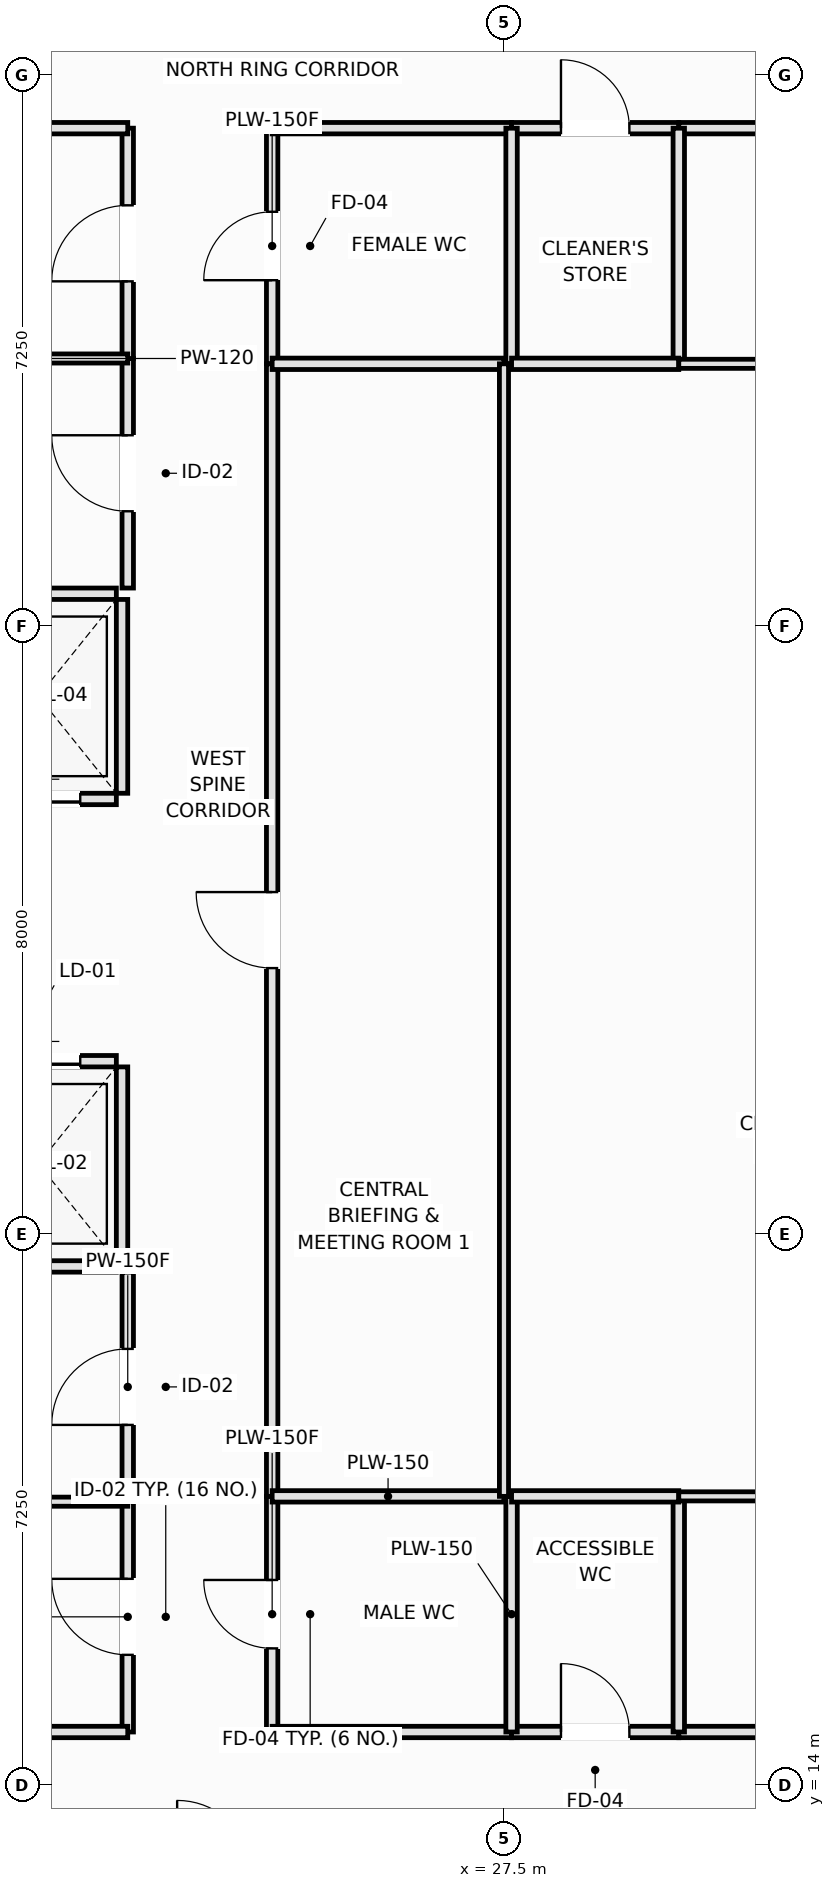
"""IFC4 building model, lengths in metres.
Left out: names, types, materials, properties, quantities, classifications, styles, units other than length and angle.
Written with IfcOpenShell. Run it as: python <this file> out.ifc"""

import sys

from ifc_helpers import new_model, si_unit, direction, frame, frame_2d, origin, place, context, subcontext, project, spatial, rectangle, extrude, element, fill, save


model = new_model("IFC4")
c1 = context("Model", 3, precision=1e-05, world=origin(), true_north=direction((0.0, 1.0)))
c2 = subcontext(c1, "Body", "Model", "MODEL_VIEW")
j1 = project(units=[si_unit("LENGTHUNIT", "METRE"), si_unit("PLANEANGLEUNIT", "RADIAN")], contexts=[c1])
p1 = place(None, origin())
s1 = spatial("IfcSite", under=j1, at=p1, CompositionType="ELEMENT")
p2 = place(p1, origin())
s2 = spatial("IfcBuilding", under=s1, at=p2, CompositionType="ELEMENT")
p3 = place(p2, frame((0.0, 0.0, 29.15)))
s3 = spatial("IfcBuildingStorey", under=s2, at=p3, CompositionType="ELEMENT", Elevation=29.15)
p4 = place(p3, frame((20.35, 20.825, 0.0), z_axis=(0.0, 0.0, 1.0), x_axis=(1.0, 0.0, 0.0)))
e1 = element("IfcWall", 1, at=p4, inside=s3, PredefinedType="PARTITIONING", context=c2, shape_type="SweptSolid", body=[
    extrude(rectangle(XDim=2.05, YDim=0.15, at=frame_2d((1.025, 0.0))), origin(), (0.0, 0.0, 1.0), 3.37),
])
p5 = place(p3, frame((20.35, 23.525, 0.0), z_axis=(0.0, 0.0, 1.0), x_axis=(1.0, 0.0, 0.0)))
e2 = element("IfcWall", 2, at=p5, inside=s3, PredefinedType="PARTITIONING", context=c2, shape_type="SweptSolid", body=[
    extrude(rectangle(XDim=2.05, YDim=0.15, at=frame_2d((1.025, 0.0))), origin(), (0.0, 0.0, 1.0), 3.37),
])
p6 = place(p5, frame((0.475, 0.0, 0.0)))
e3 = element("IfcOpeningElement", 3, at=p6, cuts=e2, PredefinedType="OPENING", context=c2, shape_type="SweptSolid", body=[
    extrude(rectangle(XDim=1.1, YDim=2.2, at=frame_2d((0.55, 1.1))), frame((0.0, 0.085, 0.0), z_axis=(0.0, -1.0, 0.0), x_axis=(1.0, 0.0, 0.0)), (0.0, 0.0, 1.0), 0.17),
])
p7 = place(p3, frame((22.475, 20.9, 0.0), z_axis=(0.0, 0.0, 1.0), x_axis=(0.0, 1.0, 0.0)))
e4 = element("IfcWall", 4, at=p7, inside=s3, PredefinedType="PARTITIONING", context=c2, shape_type="SweptSolid", body=[
    extrude(rectangle(XDim=2.55, YDim=0.15, at=frame_2d((1.275, 0.0))), origin(), (0.0, 0.0, 1.0), 3.37),
])
p8 = place(p3, frame((20.35, 26.975, 0.0), z_axis=(0.0, 0.0, 1.0), x_axis=(1.0, 0.0, 0.0)))
e5 = element("IfcWall", 5, at=p8, inside=s3, PredefinedType="PARTITIONING", context=c2, shape_type="SweptSolid", body=[
    extrude(rectangle(XDim=2.05, YDim=0.15, at=frame_2d((1.025, 0.0))), origin(), (0.0, 0.0, 1.0), 3.37),
])
p9 = place(p8, frame((0.475, 0.0, 0.0)))
e6 = element("IfcOpeningElement", 6, at=p9, cuts=e5, PredefinedType="OPENING", context=c2, shape_type="SweptSolid", body=[
    extrude(rectangle(XDim=1.1, YDim=2.2, at=frame_2d((0.55, 1.1))), frame((0.0, 0.085, 0.0), z_axis=(0.0, -1.0, 0.0), x_axis=(1.0, 0.0, 0.0)), (0.0, 0.0, 1.0), 0.17),
])
p10 = place(p3, frame((20.35, 29.675, 0.0), z_axis=(0.0, 0.0, 1.0), x_axis=(1.0, 0.0, 0.0)))
e7 = element("IfcWall", 7, at=p10, inside=s3, PredefinedType="PARTITIONING", context=c2, shape_type="SweptSolid", body=[
    extrude(rectangle(XDim=2.05, YDim=0.15, at=frame_2d((1.025, 0.0))), origin(), (0.0, 0.0, 1.0), 3.37),
])
p11 = place(p3, frame((22.475, 27.05, 0.0), z_axis=(0.0, 0.0, 1.0), x_axis=(0.0, 1.0, 0.0)))
e8 = element("IfcWall", 8, at=p11, inside=s3, PredefinedType="PARTITIONING", context=c2, shape_type="SweptSolid", body=[
    extrude(rectangle(XDim=2.55, YDim=0.15, at=frame_2d((1.275, 0.0))), origin(), (0.0, 0.0, 1.0), 3.37),
])
p12 = place(p3, frame((22.55, 14.7, 0.0), z_axis=(0.0, 0.0, 1.0), x_axis=(0.0, 1.0, 0.0)))
e9 = element("IfcWall", 9, at=p12, inside=s3, PredefinedType="PARTITIONING", context=c2, shape_type="SweptSolid", body=[
    extrude(rectangle(XDim=3.03, YDim=0.15, at=frame_2d((1.515, 0.0))), origin(), (0.0, 0.0, 1.0), 3.01),
])
p13 = place(p12, frame((1.015, 0.0, 0.0)))
e10 = element("IfcOpeningElement", 10, at=p13, cuts=e9, PredefinedType="OPENING", context=c2, shape_type="SweptSolid", body=[
    extrude(rectangle(XDim=1.0, YDim=2.15, at=frame_2d((0.5, 1.075))), frame((0.0, 0.085, 0.0), z_axis=(0.0, -1.0, 0.0), x_axis=(1.0, 0.0, 0.0)), (0.0, 0.0, 1.0), 0.17),
])
p14 = place(p3, frame((22.55, 17.73, 0.0), z_axis=(0.0, 0.0, 1.0), x_axis=(0.0, 1.0, 0.0)))
e11 = element("IfcWall", 11, at=p14, inside=s3, PredefinedType="PARTITIONING", context=c2, shape_type="SweptSolid", body=[
    extrude(rectangle(XDim=3.02, YDim=0.15, at=frame_2d((1.51, 0.0))), origin(), (0.0, 0.0, 1.0), 3.01),
])
p15 = place(p14, frame((1.01, 0.0, 0.0)))
e12 = element("IfcOpeningElement", 12, at=p15, cuts=e11, PredefinedType="OPENING", context=c2, shape_type="SweptSolid", body=[
    extrude(rectangle(XDim=1.0, YDim=2.15, at=frame_2d((0.5, 1.075))), frame((0.0, 0.085, 0.0), z_axis=(0.0, -1.0, 0.0), x_axis=(1.0, 0.0, 0.0)), (0.0, 0.0, 1.0), 0.17),
])
p16 = place(p3, frame((22.55, 29.75, 0.0), z_axis=(0.0, 0.0, 1.0), x_axis=(0.0, 1.0, 0.0)))
e13 = element("IfcWall", 13, at=p16, inside=s3, PredefinedType="PARTITIONING", context=c2, shape_type="SweptSolid", body=[
    extrude(rectangle(XDim=3.02, YDim=0.15, at=frame_2d((1.51, 0.0))), origin(), (0.0, 0.0, 1.0), 3.01),
])
p17 = place(p16, frame((1.01, 0.0, 0.0)))
e14 = element("IfcOpeningElement", 14, at=p17, cuts=e13, PredefinedType="OPENING", context=c2, shape_type="SweptSolid", body=[
    extrude(rectangle(XDim=1.0, YDim=2.15, at=frame_2d((0.5, 1.075))), frame((0.0, 0.085, 0.0), z_axis=(0.0, -1.0, 0.0), x_axis=(1.0, 0.0, 0.0)), (0.0, 0.0, 1.0), 0.17),
])
p18 = place(p3, frame((22.55, 32.77, 0.0), z_axis=(0.0, 0.0, 1.0), x_axis=(0.0, 1.0, 0.0)))
e15 = element("IfcWall", 15, at=p18, inside=s3, PredefinedType="PARTITIONING", context=c2, shape_type="SweptSolid", body=[
    extrude(rectangle(XDim=3.03, YDim=0.15, at=frame_2d((1.515, 0.0))), origin(), (0.0, 0.0, 1.0), 3.01),
])
p19 = place(p18, frame((1.015, 0.0, 0.0)))
e16 = element("IfcOpeningElement", 16, at=p19, cuts=e15, PredefinedType="OPENING", context=c2, shape_type="SweptSolid", body=[
    extrude(rectangle(XDim=1.0, YDim=2.15, at=frame_2d((0.5, 1.075))), frame((0.0, 0.085, 0.0), z_axis=(0.0, -1.0, 0.0), x_axis=(1.0, 0.0, 0.0)), (0.0, 0.0, 1.0), 0.17),
])
p20 = place(p3, frame((24.45, 14.7, 0.0), z_axis=(0.0, 0.0, 1.0), x_axis=(0.0, 1.0, 0.0)))
e17 = element("IfcWall", 17, at=p20, inside=s3, PredefinedType="PLUMBINGWALL", context=c2, shape_type="SweptSolid", body=[
    extrude(rectangle(XDim=3.1, YDim=0.15, at=frame_2d((1.55, 0.0))), origin(), (0.0, 0.0, 1.0), 3.37),
])
p21 = place(p20, frame((1.1, 0.0, 0.0)))
e18 = element("IfcOpeningElement", 18, at=p21, cuts=e17, PredefinedType="OPENING", context=c2, shape_type="SweptSolid", body=[
    extrude(rectangle(XDim=0.9, YDim=2.1, at=frame_2d((0.45, 1.05))), frame((0.0, 0.085, 0.0), z_axis=(0.0, -1.0, 0.0), x_axis=(1.0, 0.0, 0.0)), (0.0, 0.0, 1.0), 0.17),
])
p22 = place(p3, frame((24.45, 32.7, 0.0), z_axis=(0.0, 0.0, 1.0), x_axis=(0.0, 1.0, 0.0)))
e19 = element("IfcWall", 19, at=p22, inside=s3, PredefinedType="PLUMBINGWALL", context=c2, shape_type="SweptSolid", body=[
    extrude(rectangle(XDim=3.1, YDim=0.15, at=frame_2d((1.55, 0.0))), origin(), (0.0, 0.0, 1.0), 3.37),
])
p23 = place(p22, frame((1.1, 0.0, 0.0)))
e20 = element("IfcOpeningElement", 20, at=p23, cuts=e19, PredefinedType="OPENING", context=c2, shape_type="SweptSolid", body=[
    extrude(rectangle(XDim=0.9, YDim=2.1, at=frame_2d((0.45, 1.05))), frame((0.0, 0.085, 0.0), z_axis=(0.0, -1.0, 0.0), x_axis=(1.0, 0.0, 0.0)), (0.0, 0.0, 1.0), 0.17),
])
p24 = place(p3, frame((24.45, 17.8, 0.0), z_axis=(0.0, 0.0, 1.0), x_axis=(0.0, 1.0, 0.0)))
e21 = element("IfcWall", 21, at=p24, inside=s3, PredefinedType="PARTITIONING", context=c2, shape_type="SweptSolid", body=[
    extrude(rectangle(XDim=14.9, YDim=0.15, at=frame_2d((7.45, 0.0))), origin(), (0.0, 0.0, 1.0), 3.37),
])
p25 = place(p24, frame((6.95, 0.0, 0.0)))
e22 = element("IfcOpeningElement", 22, at=p25, cuts=e21, PredefinedType="OPENING", context=c2, shape_type="SweptSolid", body=[
    extrude(rectangle(XDim=1.0, YDim=2.15, at=frame_2d((0.5, 1.075))), frame((0.0, 0.085, 0.0), z_axis=(0.0, -1.0, 0.0), x_axis=(1.0, 0.0, 0.0)), (0.0, 0.0, 1.0), 0.17),
])
p26 = place(p3, frame((19.9, 14.7, 0.0), z_axis=(0.0, 0.0, 1.0), x_axis=(1.0, 0.0, 0.0)))
e23 = element("IfcWall", 23, at=p26, inside=s3, PredefinedType="PARTITIONING", context=c2, shape_type="SweptSolid", body=[
    extrude(rectangle(XDim=2.65, YDim=0.15, at=frame_2d((1.325, 0.0))), origin(), (0.0, 0.0, 1.0), 3.37),
])
p27 = place(p3, frame((24.45, 14.7, 0.0), z_axis=(0.0, 0.0, 1.0), x_axis=(1.0, 0.0, 0.0)))
e24 = element("IfcWall", 24, at=p27, inside=s3, PredefinedType="PLUMBINGWALL", context=c2, shape_type="SweptSolid", body=[
    extrude(rectangle(XDim=3.15, YDim=0.15, at=frame_2d((1.575, 0.0))), origin(), (0.0, 0.0, 1.0), 3.37),
])
p28 = place(p3, frame((27.6, 14.7, 0.0), z_axis=(0.0, 0.0, 1.0), x_axis=(1.0, 0.0, 0.0)))
e25 = element("IfcWall", 25, at=p28, inside=s3, PredefinedType="PLUMBINGWALL", context=c2, shape_type="SweptSolid", body=[
    extrude(rectangle(XDim=2.2, YDim=0.15, at=frame_2d((1.1, 0.0))), origin(), (0.0, 0.0, 1.0), 3.37),
])
p29 = place(p28, frame((0.65, 0.0, 0.0)))
e26 = element("IfcOpeningElement", 26, at=p29, cuts=e25, PredefinedType="OPENING", context=c2, shape_type="SweptSolid", body=[
    extrude(rectangle(XDim=0.9, YDim=2.1, at=frame_2d((0.45, 1.05))), frame((0.0, 0.085, 0.0), z_axis=(0.0, -1.0, 0.0), x_axis=(1.0, 0.0, 0.0)), (0.0, 0.0, 1.0), 0.17),
])
p30 = place(p3, frame((29.8, 14.7, 0.0), z_axis=(0.0, 0.0, 1.0), x_axis=(1.0, 0.0, 0.0)))
e27 = element("IfcWall", 27, at=p30, inside=s3, PredefinedType="PARTITIONING", context=c2, shape_type="SweptSolid", body=[
    extrude(rectangle(XDim=6.5, YDim=0.15, at=frame_2d((3.25, 0.0))), origin(), (0.0, 0.0, 1.0), 3.37),
])
p31 = place(p3, frame((19.9, 35.8, 0.0), z_axis=(0.0, 0.0, 1.0), x_axis=(1.0, 0.0, 0.0)))
e28 = element("IfcWall", 28, at=p31, inside=s3, PredefinedType="PARTITIONING", context=c2, shape_type="SweptSolid", body=[
    extrude(rectangle(XDim=2.65, YDim=0.15, at=frame_2d((1.325, 0.0))), origin(), (0.0, 0.0, 1.0), 3.37),
])
p32 = place(p3, frame((24.45, 35.8, 0.0), z_axis=(0.0, 0.0, 1.0), x_axis=(1.0, 0.0, 0.0)))
e29 = element("IfcWall", 29, at=p32, inside=s3, PredefinedType="PLUMBINGWALL", context=c2, shape_type="SweptSolid", body=[
    extrude(rectangle(XDim=3.15, YDim=0.15, at=frame_2d((1.575, 0.0))), origin(), (0.0, 0.0, 1.0), 3.37),
])
p33 = place(p3, frame((27.6, 35.8, 0.0), z_axis=(0.0, 0.0, 1.0), x_axis=(1.0, 0.0, 0.0)))
e30 = element("IfcWall", 30, at=p33, inside=s3, PredefinedType="PLUMBINGWALL", context=c2, shape_type="SweptSolid", body=[
    extrude(rectangle(XDim=2.2, YDim=0.15, at=frame_2d((1.1, 0.0))), origin(), (0.0, 0.0, 1.0), 3.37),
])
p34 = place(p33, frame((0.65, 0.0, 0.0)))
e31 = element("IfcOpeningElement", 31, at=p34, cuts=e30, PredefinedType="OPENING", context=c2, shape_type="SweptSolid", body=[
    extrude(rectangle(XDim=0.9, YDim=2.1, at=frame_2d((0.45, 1.05))), frame((0.0, 0.085, 0.0), z_axis=(0.0, -1.0, 0.0), x_axis=(1.0, 0.0, 0.0)), (0.0, 0.0, 1.0), 0.17),
])
p35 = place(p3, frame((29.8, 35.8, 0.0), z_axis=(0.0, 0.0, 1.0), x_axis=(1.0, 0.0, 0.0)))
e32 = element("IfcWall", 32, at=p35, inside=s3, PredefinedType="PARTITIONING", context=c2, shape_type="SweptSolid", body=[
    extrude(rectangle(XDim=6.5, YDim=0.15, at=frame_2d((3.25, 0.0))), origin(), (0.0, 0.0, 1.0), 3.37),
])
for number, where, z_axis, x_axis in (
    (33, (19.9, 17.73, 0.0), (0.0, 0.0, 1.0), (1.0, 0.0, 0.0)),
    (34, (19.9, 32.77, 0.0), (0.0, 0.0, 1.0), (1.0, 0.0, 0.0)),
):
    element("IfcWall", number, at=place(p3, frame(where, z_axis=z_axis, x_axis=x_axis)), inside=s3, PredefinedType="PARTITIONING", context=c2, shape_type="SweptSolid", body=[
        extrude(rectangle(XDim=2.65, YDim=0.12, at=frame_2d((1.325, 0.0))), origin(), (0.0, 0.0, 1.0), 3.37),
    ])
p36 = place(p3, frame((27.6, 14.7, 0.0), z_axis=(0.0, 0.0, 1.0), x_axis=(0.0, 1.0, 0.0)))
e35 = element("IfcWall", 35, at=p36, inside=s3, PredefinedType="PLUMBINGWALL", context=c2, shape_type="SweptSolid", body=[
    extrude(rectangle(XDim=3.1, YDim=0.15, at=frame_2d((1.55, 0.0))), origin(), (0.0, 0.0, 1.0), 3.37),
])
p37 = place(p3, frame((24.45, 17.8, 0.0), z_axis=(0.0, 0.0, 1.0), x_axis=(1.0, 0.0, 0.0)))
e36 = element("IfcWall", 36, at=p37, inside=s3, PredefinedType="PLUMBINGWALL", context=c2, shape_type="SweptSolid", body=[
    extrude(rectangle(XDim=3.05, YDim=0.15, at=frame_2d((1.525, 0.0))), origin(), (0.0, 0.0, 1.0), 3.37),
])
p38 = place(p3, frame((27.6, 32.7, 0.0), z_axis=(0.0, 0.0, 1.0), x_axis=(0.0, 1.0, 0.0)))
e37 = element("IfcWall", 37, at=p38, inside=s3, PredefinedType="PLUMBINGWALL", context=c2, shape_type="SweptSolid", body=[
    extrude(rectangle(XDim=3.1, YDim=0.15, at=frame_2d((1.55, 0.0))), origin(), (0.0, 0.0, 1.0), 3.37),
])
p39 = place(p3, frame((24.45, 32.7, 0.0), z_axis=(0.0, 0.0, 1.0), x_axis=(1.0, 0.0, 0.0)))
e38 = element("IfcWall", 38, at=p39, inside=s3, PredefinedType="PLUMBINGWALL", context=c2, shape_type="SweptSolid", body=[
    extrude(rectangle(XDim=3.05, YDim=0.15, at=frame_2d((1.525, 0.0))), origin(), (0.0, 0.0, 1.0), 3.37),
])
p40 = place(p3, frame((29.8, 14.7, 0.0), z_axis=(0.0, 0.0, 1.0), x_axis=(0.0, 1.0, 0.0)))
e39 = element("IfcWall", 39, at=p40, inside=s3, PredefinedType="PLUMBINGWALL", context=c2, shape_type="SweptSolid", body=[
    extrude(rectangle(XDim=3.1, YDim=0.15, at=frame_2d((1.55, 0.0))), origin(), (0.0, 0.0, 1.0), 3.37),
])
p41 = place(p3, frame((27.6, 17.8, 0.0), z_axis=(0.0, 0.0, 1.0), x_axis=(1.0, 0.0, 0.0)))
e40 = element("IfcWall", 40, at=p41, inside=s3, PredefinedType="PLUMBINGWALL", context=c2, shape_type="SweptSolid", body=[
    extrude(rectangle(XDim=2.2, YDim=0.15, at=frame_2d((1.1, 0.0))), origin(), (0.0, 0.0, 1.0), 3.37),
])
p42 = place(p3, frame((29.8, 32.7, 0.0), z_axis=(0.0, 0.0, 1.0), x_axis=(0.0, 1.0, 0.0)))
e41 = element("IfcWall", 41, at=p42, inside=s3, PredefinedType="PLUMBINGWALL", context=c2, shape_type="SweptSolid", body=[
    extrude(rectangle(XDim=3.1, YDim=0.15, at=frame_2d((1.55, 0.0))), origin(), (0.0, 0.0, 1.0), 3.37),
])
p43 = place(p3, frame((27.6, 32.7, 0.0), z_axis=(0.0, 0.0, 1.0), x_axis=(1.0, 0.0, 0.0)))
e42 = element("IfcWall", 42, at=p43, inside=s3, PredefinedType="PLUMBINGWALL", context=c2, shape_type="SweptSolid", body=[
    extrude(rectangle(XDim=2.2, YDim=0.15, at=frame_2d((1.1, 0.0))), origin(), (0.0, 0.0, 1.0), 3.37),
])
for number, where, z_axis, x_axis in (
    (43, (29.8, 17.8, 0.0), (0.0, 0.0, 1.0), (1.0, 0.0, 0.0)),
    (44, (29.8, 32.7, 0.0), (0.0, 0.0, 1.0), (1.0, 0.0, 0.0)),
):
    element("IfcWall", number, at=place(p3, frame(where, z_axis=z_axis, x_axis=x_axis)), inside=s3, PredefinedType="PARTITIONING", context=c2, shape_type="SweptSolid", body=[
        extrude(rectangle(XDim=6.5, YDim=0.12, at=frame_2d((3.25, 0.0))), origin(), (0.0, 0.0, 1.0), 3.37),
    ])
p44 = place(p3, frame((27.5, 17.8, 0.0), z_axis=(0.0, 0.0, 1.0), x_axis=(0.0, 1.0, 0.0)))
e45 = element("IfcWall", 45, at=p44, inside=s3, PredefinedType="PARTITIONING", context=c2, shape_type="SweptSolid", body=[
    extrude(rectangle(XDim=14.9, YDim=0.12, at=frame_2d((7.45, 0.0))), origin(), (0.0, 0.0, 1.0), 3.37),
])
p45 = place(p6, origin())
e46 = element("IfcDoor", 46, at=p45, inside=s3, OperationType="DOUBLE_DOOR_SLIDING", PredefinedType="DOOR", context=c2, shape_type="SweptSolid", body=[
    extrude(rectangle(XDim=1.1, YDim=2.2, at=frame_2d((0.55, 1.1))), frame((0.0, 0.025, 0.0), z_axis=(0.0, -1.0, 0.0), x_axis=(1.0, 0.0, 0.0)), (0.0, 0.0, 1.0), 0.05),
])
fill(e3, e46)
p46 = place(p9, origin())
e47 = element("IfcDoor", 47, at=p46, inside=s3, OperationType="DOUBLE_DOOR_SLIDING", PredefinedType="DOOR", context=c2, shape_type="SweptSolid", body=[
    extrude(rectangle(XDim=1.1, YDim=2.2, at=frame_2d((0.55, 1.1))), frame((0.0, 0.025, 0.0), z_axis=(0.0, -1.0, 0.0), x_axis=(1.0, 0.0, 0.0)), (0.0, 0.0, 1.0), 0.05),
])
fill(e6, e47)
p47 = place(p13, origin())
e48 = element("IfcDoor", 48, at=p47, inside=s3, OperationType="SINGLE_SWING_RIGHT", PredefinedType="DOOR", context=c2, shape_type="SweptSolid", body=[
    extrude(rectangle(XDim=1.0, YDim=2.15, at=frame_2d((0.5, 1.075))), frame((0.0, 0.025, 0.0), z_axis=(0.0, -1.0, 0.0), x_axis=(1.0, 0.0, 0.0)), (0.0, 0.0, 1.0), 0.05),
])
fill(e10, e48)
p48 = place(p15, origin())
e49 = element("IfcDoor", 49, at=p48, inside=s3, OperationType="SINGLE_SWING_LEFT", PredefinedType="DOOR", context=c2, shape_type="SweptSolid", body=[
    extrude(rectangle(XDim=1.0, YDim=2.15, at=frame_2d((0.5, 1.075))), frame((0.0, 0.025, 0.0), z_axis=(0.0, -1.0, 0.0), x_axis=(1.0, 0.0, 0.0)), (0.0, 0.0, 1.0), 0.05),
])
fill(e12, e49)
p49 = place(p17, origin())
e50 = element("IfcDoor", 50, at=p49, inside=s3, OperationType="SINGLE_SWING_RIGHT", PredefinedType="DOOR", context=c2, shape_type="SweptSolid", body=[
    extrude(rectangle(XDim=1.0, YDim=2.15, at=frame_2d((0.5, 1.075))), frame((0.0, 0.025, 0.0), z_axis=(0.0, -1.0, 0.0), x_axis=(1.0, 0.0, 0.0)), (0.0, 0.0, 1.0), 0.05),
])
fill(e14, e50)
p50 = place(p19, origin())
e51 = element("IfcDoor", 51, at=p50, inside=s3, OperationType="SINGLE_SWING_LEFT", PredefinedType="DOOR", context=c2, shape_type="SweptSolid", body=[
    extrude(rectangle(XDim=1.0, YDim=2.15, at=frame_2d((0.5, 1.075))), frame((0.0, 0.025, 0.0), z_axis=(0.0, -1.0, 0.0), x_axis=(1.0, 0.0, 0.0)), (0.0, 0.0, 1.0), 0.05),
])
fill(e16, e51)
p51 = place(p21, origin())
e52 = element("IfcDoor", 52, at=p51, inside=s3, OperationType="SINGLE_SWING_RIGHT", PredefinedType="DOOR", context=c2, shape_type="SweptSolid", body=[
    extrude(rectangle(XDim=0.9, YDim=2.1, at=frame_2d((0.45, 1.05))), frame((0.0, 0.025, 0.0), z_axis=(0.0, -1.0, 0.0), x_axis=(1.0, 0.0, 0.0)), (0.0, 0.0, 1.0), 0.05),
])
fill(e18, e52)
p52 = place(p23, origin())
e53 = element("IfcDoor", 53, at=p52, inside=s3, OperationType="SINGLE_SWING_LEFT", PredefinedType="DOOR", context=c2, shape_type="SweptSolid", body=[
    extrude(rectangle(XDim=0.9, YDim=2.1, at=frame_2d((0.45, 1.05))), frame((0.0, 0.025, 0.0), z_axis=(0.0, -1.0, 0.0), x_axis=(1.0, 0.0, 0.0)), (0.0, 0.0, 1.0), 0.05),
])
fill(e20, e53)
p53 = place(p25, origin())
e54 = element("IfcDoor", 54, at=p53, inside=s3, OperationType="SINGLE_SWING_RIGHT", PredefinedType="DOOR", context=c2, shape_type="SweptSolid", body=[
    extrude(rectangle(XDim=1.0, YDim=2.15, at=frame_2d((0.5, 1.075))), frame((0.0, 0.025, 0.0), z_axis=(0.0, -1.0, 0.0), x_axis=(1.0, 0.0, 0.0)), (0.0, 0.0, 1.0), 0.05),
])
fill(e22, e54)
p54 = place(p29, origin())
e55 = element("IfcDoor", 55, at=p54, inside=s3, OperationType="SINGLE_SWING_LEFT", PredefinedType="DOOR", context=c2, shape_type="SweptSolid", body=[
    extrude(rectangle(XDim=0.9, YDim=2.1, at=frame_2d((0.45, 1.05))), frame((0.0, 0.025, 0.0), z_axis=(0.0, -1.0, 0.0), x_axis=(1.0, 0.0, 0.0)), (0.0, 0.0, 1.0), 0.05),
])
fill(e26, e55)
p55 = place(p34, origin())
e56 = element("IfcDoor", 56, at=p55, inside=s3, OperationType="SINGLE_SWING_LEFT", PredefinedType="DOOR", context=c2, shape_type="SweptSolid", body=[
    extrude(rectangle(XDim=0.9, YDim=2.1, at=frame_2d((0.45, 1.05))), frame((0.0, 0.025, 0.0), z_axis=(0.0, -1.0, 0.0), x_axis=(1.0, 0.0, 0.0)), (0.0, 0.0, 1.0), 0.05),
])
fill(e31, e56)
save(model, sys.argv[1])
